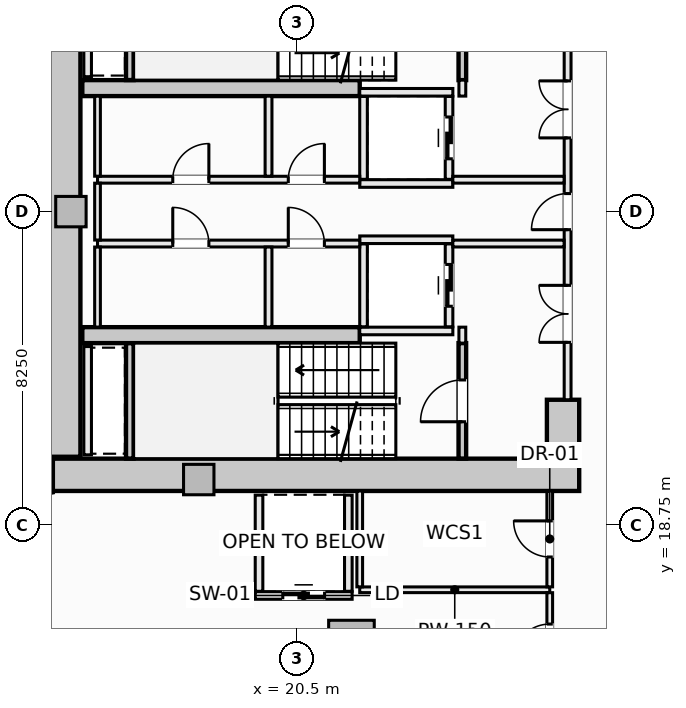
"""IFC4 building model, lengths in metres.
Left out: names, types, materials, properties, quantities, classifications, styles, units other than length and angle.
Written with IfcOpenShell. Run it as: python <this file> out.ifc"""

import sys

from ifc_helpers import new_model, si_unit, direction, frame, frame_2d, origin, origin_2d, place, context, subcontext, project, spatial, rectangle, extrude, element, fill, save


model = new_model("IFC4")
c1 = context("Model", 3, precision=1e-05, world=origin(), true_north=direction((0.0, 1.0)))
c2 = subcontext(c1, "Body", "Model", "MODEL_VIEW")
j1 = project(units=[si_unit("LENGTHUNIT", "METRE"), si_unit("PLANEANGLEUNIT", "RADIAN")], contexts=[c1])
p1 = place(None, origin())
s1 = spatial("IfcSite", under=j1, at=p1, CompositionType="ELEMENT")
p2 = place(p1, origin())
s2 = spatial("IfcBuilding", under=s1, at=p2, CompositionType="ELEMENT")
p3 = place(p2, frame((0.0, 0.0, 26.5)))
s3 = spatial("IfcBuildingStorey", under=s2, at=p3, CompositionType="ELEMENT", Elevation=26.5)
p4 = place(p3, frame((14.075, 20.075, -0.28), z_axis=(0.0, 0.0, 1.0), x_axis=(1.0, 0.0, 0.0)))
e1 = element("IfcWall", 1, at=p4, inside=s3, PredefinedType="SHEAR", context=c2, shape_type="SweptSolid", body=[
    extrude(rectangle(XDim=13.85, YDim=0.85, at=frame_2d((6.925, 0.0))), origin(), (0.0, 0.0, 1.0), 3.85),
])
p5 = place(p3, frame((14.375, 20.55, -0.28), z_axis=(0.0, 0.0, 1.0), x_axis=(0.0, 1.0, 0.0)))
e2 = element("IfcWall", 2, at=p5, inside=s3, PredefinedType="SHEAR", context=c2, shape_type="SweptSolid", body=[
    extrude(rectangle(XDim=12.9, YDim=0.85, at=frame_2d((6.45, 0.0))), origin(), (0.0, 0.0, 1.0), 3.85),
])
p6 = place(p3, frame((27.5, 20.55, -0.28), z_axis=(0.0, 0.0, 1.0), x_axis=(0.0, 1.0, 0.0)))
e3 = element("IfcWall", 3, at=p6, inside=s3, PredefinedType="SHEAR", context=c2, shape_type="SweptSolid", body=[
    extrude(rectangle(XDim=1.5, YDim=0.85, at=frame_2d((0.75, 0.0))), origin(), (0.0, 0.0, 1.0), 3.85),
])
for number, where, z_axis, x_axis in (
    (4, (14.85, 30.25, -0.28), (0.0, 0.0, 1.0), (1.0, 0.0, 0.0)),
    (5, (14.85, 23.75, -0.28), (0.0, 0.0, 1.0), (1.0, 0.0, 0.0)),
):
    element("IfcWall", number, at=place(p3, frame(where, z_axis=z_axis, x_axis=x_axis)), inside=s3, PredefinedType="SHEAR", context=c2, shape_type="SweptSolid", body=[
        extrude(rectangle(XDim=7.3, YDim=0.42, at=frame_2d((3.65, 0.0))), origin(), (0.0, 0.0, 1.0), 3.85),
    ])
p7 = place(p3, frame((21.932, 15.648, -0.28), z_axis=(0.0, 0.0, 1.0), x_axis=(1.0, 0.0, 0.0)))
e6 = element("IfcColumn", 6, at=p7, inside=s3, PredefinedType="COLUMN", context=c2, shape_type="SweptSolid", body=[
    extrude(rectangle(XDim=1.2, YDim=1.2, at=origin_2d()), origin(), (0.0, 0.0, 1.0), 3.85),
])
for number, where, z_axis, x_axis in (
    (7, (14.55, 27.0, -0.28), (0.0, 0.0, 1.0), (1.0, 0.0, 0.0)),
    (8, (17.914, 19.95, -0.28), (0.0, 0.0, 1.0), (1.0, 0.0, 0.0)),
):
    element("IfcColumn", number, at=place(p3, frame(where, z_axis=z_axis, x_axis=x_axis)), inside=s3, PredefinedType="PILASTER", context=c2, shape_type="SweptSolid", body=[
        extrude(rectangle(XDim=0.8, YDim=0.8, at=origin_2d()), origin(), (0.0, 0.0, 1.0), 3.85),
    ])
p8 = place(p3, frame((24.85, 30.46, -0.28), z_axis=(0.0, 0.0, 1.0), x_axis=(0.0, 1.0, 0.0)))
e9 = element("IfcWall", 9, at=p8, inside=s3, PredefinedType="SHEAR", context=c2, shape_type="SweptSolid", body=[
    extrude(rectangle(XDim=3.038, YDim=0.2, at=frame_2d((1.519, 0.0))), origin(), (0.0, 0.0, 1.0), 3.85),
])
p9 = place(p8, frame((0.969, 0.0, 0.28)))
e10 = element("IfcOpeningElement", 10, at=p9, cuts=e9, PredefinedType="OPENING", context=c2, shape_type="SweptSolid", body=[
    extrude(rectangle(XDim=1.1, YDim=2.15, at=frame_2d((0.55, 1.075))), frame((0.0, 0.11, 0.0), z_axis=(0.0, -1.0, 0.0), x_axis=(1.0, 0.0, 0.0)), (0.0, 0.0, 1.0), 0.22),
])
p10 = place(p3, frame((16.1, 30.462, -0.28), z_axis=(0.0, 0.0, 1.0), x_axis=(0.0, 1.0, 0.0)))
e11 = element("IfcWall", 11, at=p10, inside=s3, PredefinedType="SHEAR", context=c2, shape_type="SweptSolid", body=[
    extrude(rectangle(XDim=3.036, YDim=0.2, at=frame_2d((1.518, 0.0))), origin(), (0.0, 0.0, 1.0), 3.85),
])
p11 = place(p3, frame((24.85, 20.502, -0.28), z_axis=(0.0, 0.0, 1.0), x_axis=(0.0, 1.0, 0.0)))
e12 = element("IfcWall", 12, at=p11, inside=s3, PredefinedType="SHEAR", context=c2, shape_type="SweptSolid", body=[
    extrude(rectangle(XDim=3.038, YDim=0.2, at=frame_2d((1.519, 0.0))), origin(), (0.0, 0.0, 1.0), 3.85),
])
p12 = place(p11, frame((0.969, 0.0, 0.28)))
e13 = element("IfcOpeningElement", 13, at=p12, cuts=e12, PredefinedType="OPENING", context=c2, shape_type="SweptSolid", body=[
    extrude(rectangle(XDim=1.1, YDim=2.15, at=frame_2d((0.55, 1.075))), frame((0.0, 0.11, 0.0), z_axis=(0.0, -1.0, 0.0), x_axis=(1.0, 0.0, 0.0)), (0.0, 0.0, 1.0), 0.22),
])
p13 = place(p3, frame((16.1, 20.502, -0.28), z_axis=(0.0, 0.0, 1.0), x_axis=(0.0, 1.0, 0.0)))
e14 = element("IfcWall", 14, at=p13, inside=s3, PredefinedType="SHEAR", context=c2, shape_type="SweptSolid", body=[
    extrude(rectangle(XDim=3.036, YDim=0.2, at=frame_2d((1.518, 0.0))), origin(), (0.0, 0.0, 1.0), 3.85),
])
for number, where, z_axis, x_axis in (
    (15, (22.15, 30.14, 0.0), (0.0, 0.0, 1.0), (1.0, 0.0, 0.0)),
    (16, (22.15, 27.74, 0.0), (0.0, 0.0, 1.0), (1.0, 0.0, 0.0)),
):
    element("IfcWall", number, at=place(p3, frame(where, z_axis=z_axis, x_axis=x_axis)), inside=s3, PredefinedType="SOLIDWALL", context=c2, shape_type="SweptSolid", body=[
        extrude(rectangle(XDim=2.45, YDim=0.2, at=frame_2d((1.225, 0.0))), origin(), (0.0, 0.0, 1.0), 3.57),
    ])
p14 = place(p3, frame((22.25, 27.85, 0.0), z_axis=(0.0, 0.0, 1.0), x_axis=(0.0, 1.0, 0.0)))
e17 = element("IfcWall", 17, at=p14, inside=s3, PredefinedType="SOLIDWALL", context=c2, shape_type="SweptSolid", body=[
    extrude(rectangle(XDim=2.18, YDim=0.2, at=frame_2d((1.09, 0.0))), origin(), (0.0, 0.0, 1.0), 3.57),
])
p15 = place(p3, frame((24.5, 27.85, 0.0), z_axis=(0.0, 0.0, 1.0), x_axis=(0.0, 1.0, 0.0)))
e18 = element("IfcWall", 18, at=p15, inside=s3, PredefinedType="SOLIDWALL", context=c2, shape_type="SweptSolid", body=[
    extrude(rectangle(XDim=2.18, YDim=0.2, at=frame_2d((1.09, 0.0))), origin(), (0.0, 0.0, 1.0), 3.57),
])
p16 = place(p15, frame((0.54, 0.0, 0.0)))
e19 = element("IfcOpeningElement", 19, at=p16, cuts=e18, PredefinedType="OPENING", context=c2, shape_type="SweptSolid", body=[
    extrude(rectangle(XDim=1.1, YDim=2.2, at=frame_2d((0.55, 1.1))), frame((0.0, 0.11, 0.0), z_axis=(0.0, -1.0, 0.0), x_axis=(1.0, 0.0, 0.0)), (0.0, 0.0, 1.0), 0.22),
])
for number, where, z_axis, x_axis in (
    (20, (22.15, 26.26, 0.0), (0.0, 0.0, 1.0), (1.0, 0.0, 0.0)),
    (21, (22.15, 23.86, 0.0), (0.0, 0.0, 1.0), (1.0, 0.0, 0.0)),
):
    element("IfcWall", number, at=place(p3, frame(where, z_axis=z_axis, x_axis=x_axis)), inside=s3, PredefinedType="SOLIDWALL", context=c2, shape_type="SweptSolid", body=[
        extrude(rectangle(XDim=2.45, YDim=0.2, at=frame_2d((1.225, 0.0))), origin(), (0.0, 0.0, 1.0), 3.57),
    ])
p17 = place(p3, frame((22.25, 23.97, 0.0), z_axis=(0.0, 0.0, 1.0), x_axis=(0.0, 1.0, 0.0)))
e22 = element("IfcWall", 22, at=p17, inside=s3, PredefinedType="SOLIDWALL", context=c2, shape_type="SweptSolid", body=[
    extrude(rectangle(XDim=2.18, YDim=0.2, at=frame_2d((1.09, 0.0))), origin(), (0.0, 0.0, 1.0), 3.57),
])
p18 = place(p3, frame((24.5, 23.97, 0.0), z_axis=(0.0, 0.0, 1.0), x_axis=(0.0, 1.0, 0.0)))
e23 = element("IfcWall", 23, at=p18, inside=s3, PredefinedType="SOLIDWALL", context=c2, shape_type="SweptSolid", body=[
    extrude(rectangle(XDim=2.18, YDim=0.2, at=frame_2d((1.09, 0.0))), origin(), (0.0, 0.0, 1.0), 3.57),
])
p19 = place(p18, frame((0.54, 0.0, 0.0)))
e24 = element("IfcOpeningElement", 24, at=p19, cuts=e23, PredefinedType="OPENING", context=c2, shape_type="SweptSolid", body=[
    extrude(rectangle(XDim=1.1, YDim=2.2, at=frame_2d((0.55, 1.1))), frame((0.0, 0.11, 0.0), z_axis=(0.0, -1.0, 0.0), x_axis=(1.0, 0.0, 0.0)), (0.0, 0.0, 1.0), 0.22),
])
p20 = place(p3, frame((19.4, 16.9, 0.0), z_axis=(0.0, 0.0, 1.0), x_axis=(1.0, 0.0, 0.0)))
e25 = element("IfcWall", 25, at=p20, inside=s3, PredefinedType="SOLIDWALL", context=c2, shape_type="SweptSolid", body=[
    extrude(rectangle(XDim=2.55, YDim=0.2, at=frame_2d((1.275, 0.0))), origin(), (0.0, 0.0, 1.0), 3.57),
])
p21 = place(p20, frame((0.725, 0.0, 0.0)))
e26 = element("IfcOpeningElement", 26, at=p21, cuts=e25, PredefinedType="OPENING", context=c2, shape_type="SweptSolid", body=[
    extrude(rectangle(XDim=1.1, YDim=2.2, at=frame_2d((0.55, 1.1))), frame((0.0, 0.11, 0.0), z_axis=(0.0, -1.0, 0.0), x_axis=(1.0, 0.0, 0.0)), (0.0, 0.0, 1.0), 0.22),
])
for number, where, z_axis, x_axis in (
    (27, (19.5, 17.01, 0.0), (0.0, 0.0, 1.0), (0.0, 1.0, 0.0)),
    (28, (21.85, 17.01, 0.0), (0.0, 0.0, 1.0), (0.0, 1.0, 0.0)),
):
    element("IfcWall", number, at=place(p3, frame(where, z_axis=z_axis, x_axis=x_axis)), inside=s3, PredefinedType="SOLIDWALL", context=c2, shape_type="SweptSolid", body=[
        extrude(rectangle(XDim=2.53, YDim=0.2, at=frame_2d((1.265, 0.0))), origin(), (0.0, 0.0, 1.0), 3.57),
    ])
for number, where, z_axis, x_axis in (
    (29, (14.99, 30.55, 0.0), (0.0, 0.0, 1.0), (0.0, 1.0, 0.0)),
    (30, (14.99, 20.6, 0.0), (0.0, 0.0, 1.0), (0.0, 1.0, 0.0)),
):
    element("IfcWall", number, at=place(p3, frame(where, z_axis=z_axis, x_axis=x_axis)), inside=s3, PredefinedType="SOLIDWALL", context=c2, shape_type="SweptSolid", body=[
        extrude(rectangle(XDim=2.85, YDim=0.2, at=frame_2d((1.425, 0.0))), origin(), (0.0, 0.0, 1.0), 3.57),
    ])
for number, where, z_axis, x_axis in (
    (31, (24.85, 23.54, 0.0), (0.0, 0.0, 1.0), (0.0, 1.0, 0.0)),
    (32, (24.85, 30.04, 0.0), (0.0, 0.0, 1.0), (0.0, 1.0, 0.0)),
):
    element("IfcWall", number, at=place(p3, frame(where, z_axis=z_axis, x_axis=x_axis)), inside=s3, PredefinedType="SOLIDWALL", context=c2, shape_type="SweptSolid", body=[
        extrude(rectangle(XDim=0.42, YDim=0.18, at=frame_2d((0.21, 0.0))), origin(), (0.0, 0.0, 1.0), 3.57),
    ])
p22 = place(p3, frame((27.62, 22.05, 0.0), z_axis=(0.0, 0.0, 1.0), x_axis=(0.0, 1.0, 0.0)))
e33 = element("IfcWall", 33, at=p22, inside=s3, PredefinedType="SOLIDWALL", context=c2, shape_type="SweptSolid", body=[
    extrude(rectangle(XDim=9.9, YDim=0.18, at=frame_2d((4.95, 0.0))), origin(), (0.0, 0.0, 1.0), 2.662),
])
p23 = place(p22, frame((4.475, 0.0, 0.0)))
e34 = element("IfcOpeningElement", 34, at=p23, cuts=e33, PredefinedType="OPENING", context=c2, shape_type="SweptSolid", body=[
    extrude(rectangle(XDim=0.95, YDim=2.1, at=frame_2d((0.475, 1.05))), frame((0.0, 0.1, 0.0), z_axis=(0.0, -1.0, 0.0), x_axis=(1.0, 0.0, 0.0)), (0.0, 0.0, 1.0), 0.2),
])
p24 = place(p22, frame((6.89, 0.0, 0.0)))
e35 = element("IfcOpeningElement", 35, at=p24, cuts=e33, PredefinedType="OPENING", context=c2, shape_type="SweptSolid", body=[
    extrude(rectangle(XDim=1.5, YDim=2.2, at=frame_2d((0.75, 1.1))), frame((0.0, 0.1, 0.0), z_axis=(0.0, -1.0, 0.0), x_axis=(1.0, 0.0, 0.0)), (0.0, 0.0, 1.0), 0.2),
])
p25 = place(p22, frame((1.51, 0.0, 0.0)))
e36 = element("IfcOpeningElement", 36, at=p25, cuts=e33, PredefinedType="OPENING", context=c2, shape_type="SweptSolid", body=[
    extrude(rectangle(XDim=1.5, YDim=2.2, at=frame_2d((0.75, 1.1))), frame((0.0, 0.1, 0.0), z_axis=(0.0, -1.0, 0.0), x_axis=(1.0, 0.0, 0.0)), (0.0, 0.0, 1.0), 0.2),
])
p26 = place(p3, frame((15.25, 27.84, 0.0), z_axis=(0.0, 0.0, 1.0), x_axis=(1.0, 0.0, 0.0)))
e37 = element("IfcWall", 37, at=p26, inside=s3, PredefinedType="SOLIDWALL", context=c2, shape_type="SweptSolid", body=[
    extrude(rectangle(XDim=6.9, YDim=0.18, at=frame_2d((3.45, 0.0))), origin(), (0.0, 0.0, 1.0), 3.57),
])
p27 = place(p26, frame((5.02, 0.0, 0.0)))
e38 = element("IfcOpeningElement", 38, at=p27, cuts=e37, PredefinedType="OPENING", context=c2, shape_type="SweptSolid", body=[
    extrude(rectangle(XDim=0.95, YDim=2.1, at=frame_2d((0.475, 1.05))), frame((0.0, 0.1, 0.0), z_axis=(0.0, -1.0, 0.0), x_axis=(1.0, 0.0, 0.0)), (0.0, 0.0, 1.0), 0.2),
])
p28 = place(p26, frame((1.98, 0.0, 0.0)))
e39 = element("IfcOpeningElement", 39, at=p28, cuts=e37, PredefinedType="OPENING", context=c2, shape_type="SweptSolid", body=[
    extrude(rectangle(XDim=0.95, YDim=2.1, at=frame_2d((0.475, 1.05))), frame((0.0, 0.1, 0.0), z_axis=(0.0, -1.0, 0.0), x_axis=(1.0, 0.0, 0.0)), (0.0, 0.0, 1.0), 0.2),
])
p29 = place(p3, frame((24.6, 27.84, 0.0), z_axis=(0.0, 0.0, 1.0), x_axis=(1.0, 0.0, 0.0)))
e40 = element("IfcWall", 40, at=p29, inside=s3, PredefinedType="SOLIDWALL", context=c2, shape_type="SweptSolid", body=[
    extrude(rectangle(XDim=2.928, YDim=0.18, at=frame_2d((1.464, 0.0))), origin(), (0.0, 0.0, 1.0), 3.57),
])
p30 = place(p3, frame((15.25, 26.16, 0.0), z_axis=(0.0, 0.0, 1.0), x_axis=(1.0, 0.0, 0.0)))
e41 = element("IfcWall", 41, at=p30, inside=s3, PredefinedType="SOLIDWALL", context=c2, shape_type="SweptSolid", body=[
    extrude(rectangle(XDim=6.9, YDim=0.18, at=frame_2d((3.45, 0.0))), origin(), (0.0, 0.0, 1.0), 3.57),
])
p31 = place(p30, frame((5.02, 0.0, 0.0)))
e42 = element("IfcOpeningElement", 42, at=p31, cuts=e41, PredefinedType="OPENING", context=c2, shape_type="SweptSolid", body=[
    extrude(rectangle(XDim=0.95, YDim=2.1, at=frame_2d((0.475, 1.05))), frame((0.0, 0.1, 0.0), z_axis=(0.0, -1.0, 0.0), x_axis=(1.0, 0.0, 0.0)), (0.0, 0.0, 1.0), 0.2),
])
p32 = place(p30, frame((1.98, 0.0, 0.0)))
e43 = element("IfcOpeningElement", 43, at=p32, cuts=e41, PredefinedType="OPENING", context=c2, shape_type="SweptSolid", body=[
    extrude(rectangle(XDim=0.95, YDim=2.1, at=frame_2d((0.475, 1.05))), frame((0.0, 0.1, 0.0), z_axis=(0.0, -1.0, 0.0), x_axis=(1.0, 0.0, 0.0)), (0.0, 0.0, 1.0), 0.2),
])
p33 = place(p3, frame((24.6, 26.16, 0.0), z_axis=(0.0, 0.0, 1.0), x_axis=(1.0, 0.0, 0.0)))
e44 = element("IfcWall", 44, at=p33, inside=s3, PredefinedType="SOLIDWALL", context=c2, shape_type="SweptSolid", body=[
    extrude(rectangle(XDim=2.928, YDim=0.18, at=frame_2d((1.464, 0.0))), origin(), (0.0, 0.0, 1.0), 3.57),
])
p34 = place(p3, frame((15.25, 23.962, 0.0), z_axis=(0.0, 0.0, 1.0), x_axis=(0.0, 1.0, 0.0)))
e45 = element("IfcWall", 45, at=p34, inside=s3, PredefinedType="PARTITIONING", context=c2, shape_type="SweptSolid", body=[
    extrude(rectangle(XDim=2.106, YDim=0.15, at=frame_2d((1.053, 0.0))), origin(), (0.0, 0.0, 1.0), 3.57),
])
p35 = place(p3, frame((15.25, 26.252, 0.0), z_axis=(0.0, 0.0, 1.0), x_axis=(0.0, 1.0, 0.0)))
e46 = element("IfcWall", 46, at=p35, inside=s3, PredefinedType="PARTITIONING", context=c2, shape_type="SweptSolid", body=[
    extrude(rectangle(XDim=1.496, YDim=0.15, at=frame_2d((0.748, 0.0))), origin(), (0.0, 0.0, 1.0), 3.57),
])
p36 = place(p3, frame((15.25, 27.932, 0.0), z_axis=(0.0, 0.0, 1.0), x_axis=(0.0, 1.0, 0.0)))
e47 = element("IfcWall", 47, at=p36, inside=s3, PredefinedType="PARTITIONING", context=c2, shape_type="SweptSolid", body=[
    extrude(rectangle(XDim=2.106, YDim=0.15, at=frame_2d((1.053, 0.0))), origin(), (0.0, 0.0, 1.0), 3.57),
])
for number, where, z_axis, x_axis in (
    (48, (19.75, 23.962, 0.0), (0.0, 0.0, 1.0), (0.0, 1.0, 0.0)),
    (49, (19.75, 27.932, 0.0), (0.0, 0.0, 1.0), (0.0, 1.0, 0.0)),
):
    element("IfcWall", number, at=place(p3, frame(where, z_axis=z_axis, x_axis=x_axis)), inside=s3, PredefinedType="SOLIDWALL", context=c2, shape_type="SweptSolid", body=[
        extrude(rectangle(XDim=2.106, YDim=0.18, at=frame_2d((1.053, 0.0))), origin(), (0.0, 0.0, 1.0), 3.57),
    ])
p37 = place(p3, frame((22.15, 17.05, 0.0), z_axis=(0.0, 0.0, 1.0), x_axis=(1.0, 0.0, 0.0)))
e50 = element("IfcWall", 50, at=p37, inside=s3, PredefinedType="PARTITIONING", context=c2, shape_type="SweptSolid", body=[
    extrude(rectangle(XDim=5.0, YDim=0.15, at=frame_2d((2.5, 0.0))), origin(), (0.0, 0.0, 1.0), 3.57),
])
p38 = place(p3, frame((22.15, 17.127, 0.0), z_axis=(0.0, 0.0, 1.0), x_axis=(0.0, 1.0, 0.0)))
e51 = element("IfcWall", 51, at=p38, inside=s3, PredefinedType="PARTITIONING", context=c2, shape_type="SweptSolid", body=[
    extrude(rectangle(XDim=2.521, YDim=0.15, at=frame_2d((1.26, 0.0))), origin(), (0.0, 0.0, 1.0), 3.57),
])
p39 = place(p3, frame((27.15, 11.75, 0.0), z_axis=(0.0, 0.0, 1.0), x_axis=(0.0, 1.0, 0.0)))
e52 = element("IfcWall", 52, at=p39, inside=s3, PredefinedType="PARTITIONING", context=c2, shape_type="SweptSolid", body=[
    extrude(rectangle(XDim=5.223, YDim=0.15, at=frame_2d((2.611, 0.0))), origin(), (0.0, 0.0, 1.0), 3.57),
])
p40 = place(p39, frame((3.448, 0.0, 0.0)))
e53 = element("IfcOpeningElement", 53, at=p40, cuts=e52, PredefinedType="OPENING", context=c2, shape_type="SweptSolid", body=[
    extrude(rectangle(XDim=0.95, YDim=2.1, at=frame_2d((0.475, 1.05))), frame((0.0, 0.085, 0.0), z_axis=(0.0, -1.0, 0.0), x_axis=(1.0, 0.0, 0.0)), (0.0, 0.0, 1.0), 0.17),
])
p41 = place(p3, frame((27.15, 17.127, 0.0), z_axis=(0.0, 0.0, 1.0), x_axis=(0.0, 1.0, 0.0)))
e54 = element("IfcWall", 54, at=p41, inside=s3, PredefinedType="PARTITIONING", context=c2, shape_type="SweptSolid", body=[
    extrude(rectangle(XDim=2.521, YDim=0.15, at=frame_2d((1.26, 0.0))), origin(), (0.0, 0.0, 1.0), 3.57),
])
p42 = place(p41, frame((0.785, 0.0, 0.0)))
e55 = element("IfcOpeningElement", 55, at=p42, cuts=e54, PredefinedType="OPENING", context=c2, shape_type="SweptSolid", body=[
    extrude(rectangle(XDim=0.95, YDim=2.1, at=frame_2d((0.475, 1.05))), frame((0.0, 0.085, 0.0), z_axis=(0.0, -1.0, 0.0), x_axis=(1.0, 0.0, 0.0)), (0.0, 0.0, 1.0), 0.17),
])
p43 = place(p3, frame((4.865, 17.825, 0.0), z_axis=(0.0, 0.0, 1.0), x_axis=(0.980749298792, 0.195271126689, 0.0)))
e56 = element("IfcWall", 56, at=p43, inside=s3, PredefinedType="PARTITIONING", context=c2, shape_type="SweptSolid", body=[
    extrude(rectangle(XDim=9.391, YDim=0.12, at=frame_2d((4.695, 0.0))), origin(), (0.0, 0.0, 1.0), 3.57),
])
p44 = place(p12, origin())
e57 = element("IfcDoor", 57, at=p44, inside=s3, OperationType="SINGLE_SWING_LEFT", PredefinedType="DOOR", context=c2, shape_type="SweptSolid", body=[
    extrude(rectangle(XDim=1.1, YDim=2.15, at=frame_2d((0.55, 1.075))), frame((0.0, 0.025, 0.0), z_axis=(0.0, -1.0, 0.0), x_axis=(1.0, 0.0, 0.0)), (0.0, 0.0, 1.0), 0.05),
])
fill(e13, e57)
p45 = place(p16, origin())
e58 = element("IfcDoor", 58, at=p45, inside=s3, OperationType="SLIDING_TO_LEFT", PredefinedType="DOOR", context=c2, shape_type="SweptSolid", body=[
    extrude(rectangle(XDim=1.1, YDim=2.2, at=frame_2d((0.55, 1.1))), frame((0.0, 0.025, 0.0), z_axis=(0.0, -1.0, 0.0), x_axis=(1.0, 0.0, 0.0)), (0.0, 0.0, 1.0), 0.05),
])
fill(e19, e58)
p46 = place(p19, origin())
e59 = element("IfcDoor", 59, at=p46, inside=s3, OperationType="SLIDING_TO_LEFT", PredefinedType="DOOR", context=c2, shape_type="SweptSolid", body=[
    extrude(rectangle(XDim=1.1, YDim=2.2, at=frame_2d((0.55, 1.1))), frame((0.0, 0.025, 0.0), z_axis=(0.0, -1.0, 0.0), x_axis=(1.0, 0.0, 0.0)), (0.0, 0.0, 1.0), 0.05),
])
fill(e24, e59)
p47 = place(p21, origin())
e60 = element("IfcDoor", 60, at=p47, inside=s3, OperationType="SLIDING_TO_LEFT", PredefinedType="DOOR", context=c2, shape_type="SweptSolid", body=[
    extrude(rectangle(XDim=1.1, YDim=2.2, at=frame_2d((0.55, 1.1))), frame((0.0, 0.025, 0.0), z_axis=(0.0, -1.0, 0.0), x_axis=(1.0, 0.0, 0.0)), (0.0, 0.0, 1.0), 0.05),
])
fill(e26, e60)
p48 = place(p23, origin())
e61 = element("IfcDoor", 61, at=p48, inside=s3, OperationType="SINGLE_SWING_LEFT", PredefinedType="DOOR", context=c2, shape_type="SweptSolid", body=[
    extrude(rectangle(XDim=0.95, YDim=2.1, at=frame_2d((0.475, 1.05))), frame((0.0, 0.025, 0.0), z_axis=(0.0, -1.0, 0.0), x_axis=(1.0, 0.0, 0.0)), (0.0, 0.0, 1.0), 0.05),
])
fill(e34, e61)
p49 = place(p24, origin())
e62 = element("IfcDoor", 62, at=p49, inside=s3, OperationType="DOUBLE_DOOR_SINGLE_SWING", PredefinedType="DOOR", context=c2, shape_type="SweptSolid", body=[
    extrude(rectangle(XDim=1.5, YDim=2.2, at=frame_2d((0.75, 1.1))), frame((0.0, 0.025, 0.0), z_axis=(0.0, -1.0, 0.0), x_axis=(1.0, 0.0, 0.0)), (0.0, 0.0, 1.0), 0.05),
])
fill(e35, e62)
p50 = place(p25, origin())
e63 = element("IfcDoor", 63, at=p50, inside=s3, OperationType="DOUBLE_DOOR_SINGLE_SWING", PredefinedType="DOOR", context=c2, shape_type="SweptSolid", body=[
    extrude(rectangle(XDim=1.5, YDim=2.2, at=frame_2d((0.75, 1.1))), frame((0.0, 0.025, 0.0), z_axis=(0.0, -1.0, 0.0), x_axis=(1.0, 0.0, 0.0)), (0.0, 0.0, 1.0), 0.05),
])
fill(e36, e63)
p51 = place(p27, origin())
e64 = element("IfcDoor", 64, at=p51, inside=s3, OperationType="SINGLE_SWING_RIGHT", PredefinedType="DOOR", context=c2, shape_type="SweptSolid", body=[
    extrude(rectangle(XDim=0.95, YDim=2.1, at=frame_2d((0.475, 1.05))), frame((0.0, 0.025, 0.0), z_axis=(0.0, -1.0, 0.0), x_axis=(1.0, 0.0, 0.0)), (0.0, 0.0, 1.0), 0.05),
])
fill(e38, e64)
p52 = place(p31, origin())
e65 = element("IfcDoor", 65, at=p52, inside=s3, OperationType="SINGLE_SWING_LEFT", PredefinedType="DOOR", context=c2, shape_type="SweptSolid", body=[
    extrude(rectangle(XDim=0.95, YDim=2.1, at=frame_2d((0.475, 1.05))), frame((0.0, 0.025, 0.0), z_axis=(0.0, -1.0, 0.0), x_axis=(1.0, 0.0, 0.0)), (0.0, 0.0, 1.0), 0.05),
])
fill(e42, e65)
p53 = place(p28, origin())
e66 = element("IfcDoor", 66, at=p53, inside=s3, OperationType="SINGLE_SWING_RIGHT", PredefinedType="DOOR", context=c2, shape_type="SweptSolid", body=[
    extrude(rectangle(XDim=0.95, YDim=2.1, at=frame_2d((0.475, 1.05))), frame((0.0, 0.025, 0.0), z_axis=(0.0, -1.0, 0.0), x_axis=(1.0, 0.0, 0.0)), (0.0, 0.0, 1.0), 0.05),
])
fill(e39, e66)
p54 = place(p32, origin())
e67 = element("IfcDoor", 67, at=p54, inside=s3, OperationType="SINGLE_SWING_LEFT", PredefinedType="DOOR", context=c2, shape_type="SweptSolid", body=[
    extrude(rectangle(XDim=0.95, YDim=2.1, at=frame_2d((0.475, 1.05))), frame((0.0, 0.025, 0.0), z_axis=(0.0, -1.0, 0.0), x_axis=(1.0, 0.0, 0.0)), (0.0, 0.0, 1.0), 0.05),
])
fill(e43, e67)
p55 = place(p42, origin())
e68 = element("IfcDoor", 68, at=p55, inside=s3, OperationType="SINGLE_SWING_RIGHT", PredefinedType="DOOR", context=c2, shape_type="SweptSolid", body=[
    extrude(rectangle(XDim=0.95, YDim=2.1, at=frame_2d((0.475, 1.05))), frame((0.0, 0.025, 0.0), z_axis=(0.0, -1.0, 0.0), x_axis=(1.0, 0.0, 0.0)), (0.0, 0.0, 1.0), 0.05),
])
fill(e55, e68)
p56 = place(p40, origin())
e69 = element("IfcDoor", 69, at=p56, inside=s3, OperationType="SINGLE_SWING_LEFT", PredefinedType="DOOR", context=c2, shape_type="SweptSolid", body=[
    extrude(rectangle(XDim=0.95, YDim=2.1, at=frame_2d((0.475, 1.05))), frame((0.0, 0.025, 0.0), z_axis=(0.0, -1.0, 0.0), x_axis=(1.0, 0.0, 0.0)), (0.0, 0.0, 1.0), 0.05),
])
fill(e53, e69)
save(model, sys.argv[1])
